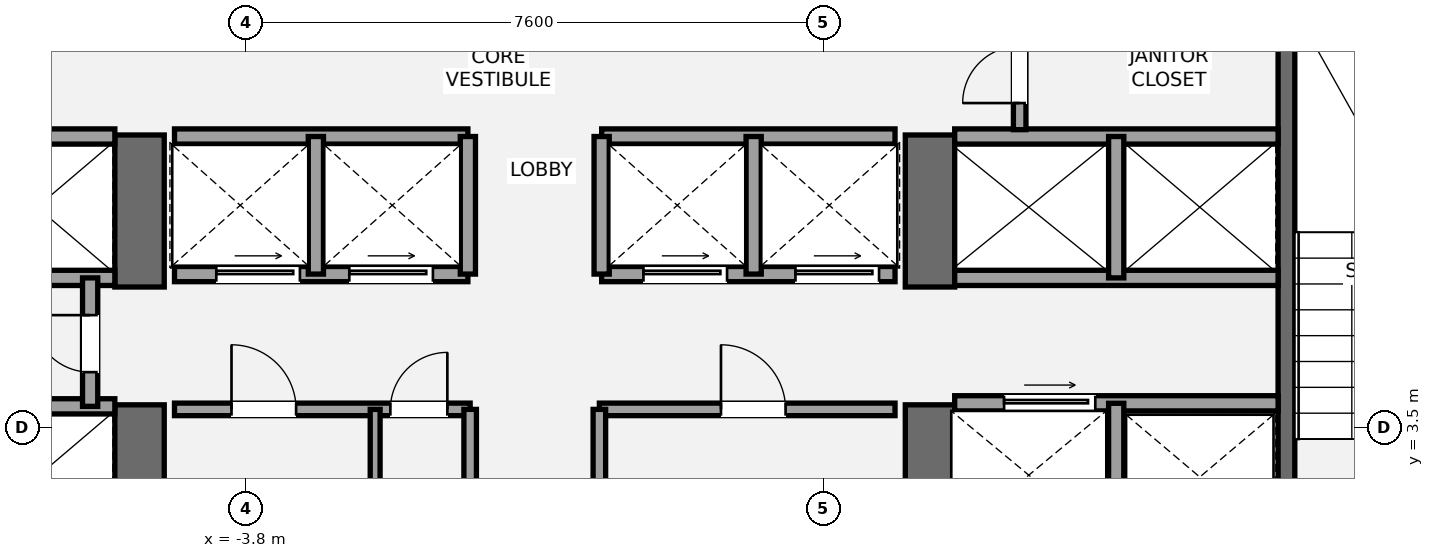
"""IFC4 building model, lengths in metres.
Left out: names, types, materials, properties, quantities, classifications, styles, units other than length and angle.
Written with IfcOpenShell. Run it as: python <this file> out.ifc"""

import sys

from ifc_helpers import new_model, si_unit, direction, frame, frame_2d, origin, place, context, subcontext, project, spatial, rectangle, extrude, element, fill, save


model = new_model("IFC4")
c1 = context("Model", 3, precision=1e-05, world=origin(), true_north=direction((0.0, 1.0)))
c2 = subcontext(c1, "Body", "Model", "MODEL_VIEW")
j1 = project(units=[si_unit("LENGTHUNIT", "METRE"), si_unit("PLANEANGLEUNIT", "RADIAN")], contexts=[c1])
p1 = place(None, origin())
s1 = spatial("IfcSite", under=j1, at=p1, CompositionType="ELEMENT")
p2 = place(p1, origin())
s2 = spatial("IfcBuilding", under=s1, at=p2, CompositionType="ELEMENT")
p3 = place(p2, frame((0.0, 0.0, 191.8)))
s3 = spatial("IfcBuildingStorey", under=s2, at=p3, CompositionType="ELEMENT", Elevation=191.8)
p4 = place(p3, frame((-5.2, 1.2, 0.0), z_axis=(0.0, 0.0, 1.0), x_axis=(0.0, 1.0, 0.0)))
e1 = element("IfcWall", 1, at=p4, inside=s3, PredefinedType="SHEAR", context=c2, shape_type="SweptSolid", body=[
    extrude(rectangle(XDim=2.6, YDim=0.65, at=frame_2d((1.3, 0.0))), origin(), (0.0, 0.0, 1.0), 3.2),
])
p5 = place(p3, frame((-5.2, 5.35, 0.0), z_axis=(0.0, 0.0, 1.0), x_axis=(0.0, 1.0, 0.0)))
e2 = element("IfcWall", 2, at=p5, inside=s3, PredefinedType="SHEAR", context=c2, shape_type="SweptSolid", body=[
    extrude(rectangle(XDim=2.0, YDim=0.65, at=frame_2d((1.0, 0.0))), origin(), (0.0, 0.0, 1.0), 3.2),
])
p6 = place(p3, frame((5.2, 1.2, 0.0), z_axis=(0.0, 0.0, 1.0), x_axis=(0.0, 1.0, 0.0)))
e3 = element("IfcWall", 3, at=p6, inside=s3, PredefinedType="SHEAR", context=c2, shape_type="SweptSolid", body=[
    extrude(rectangle(XDim=2.6, YDim=0.65, at=frame_2d((1.3, 0.0))), origin(), (0.0, 0.0, 1.0), 3.2),
])
p7 = place(p3, frame((5.2, 5.35, 0.0), z_axis=(0.0, 0.0, 1.0), x_axis=(0.0, 1.0, 0.0)))
e4 = element("IfcWall", 4, at=p7, inside=s3, PredefinedType="SHEAR", context=c2, shape_type="SweptSolid", body=[
    extrude(rectangle(XDim=2.0, YDim=0.65, at=frame_2d((1.0, 0.0))), origin(), (0.0, 0.0, 1.0), 3.2),
])
p8 = place(p3, frame((9.89, 1.85, 0.0), z_axis=(0.0, 0.0, 1.0), x_axis=(0.0, 1.0, 0.0)))
e5 = element("IfcWall", 5, at=p8, inside=s3, PredefinedType="SHEAR", context=c2, shape_type="SweptSolid", body=[
    extrude(rectangle(XDim=7.15, YDim=0.22, at=frame_2d((3.575, 0.0))), origin(), (0.0, 0.0, 1.0), 3.2),
])
for number, where, z_axis, x_axis in (
    (6, (-9.78, 3.78, 0.0), (0.0, 0.0, 1.0), (1.0, 0.0, 0.0)),
    (7, (-9.78, 5.47, 0.0), (0.0, 0.0, 1.0), (1.0, 0.0, 0.0)),
    (8, (-9.78, 7.33, 0.0), (0.0, 0.0, 1.0), (1.0, 0.0, 0.0)),
):
    element("IfcWall", number, at=place(p3, frame(where, z_axis=z_axis, x_axis=x_axis)), inside=s3, PredefinedType="SOLIDWALL", context=c2, shape_type="SweptSolid", body=[
        extrude(rectangle(XDim=4.255, YDim=0.2, at=frame_2d((2.127, 0.0))), origin(), (0.0, 0.0, 1.0), 3.02),
    ])
p9 = place(p3, frame((-5.85, 3.78, 0.0), z_axis=(0.0, 0.0, 1.0), x_axis=(0.0, 1.0, 0.0)))
e9 = element("IfcWall", 9, at=p9, inside=s3, PredefinedType="SOLIDWALL", context=c2, shape_type="SweptSolid", body=[
    extrude(rectangle(XDim=1.69, YDim=0.2, at=frame_2d((0.845, 0.0))), origin(), (0.0, 0.0, 1.0), 3.02),
])
p10 = place(p9, frame((0.45, 0.0, 0.0)))
e10 = element("IfcOpeningElement", 10, at=p10, cuts=e9, PredefinedType="OPENING", context=c2, shape_type="SweptSolid", body=[
    extrude(rectangle(XDim=0.75, YDim=2.1, at=frame_2d((0.375, 1.05))), frame((0.0, 0.11, 0.0), z_axis=(0.0, -1.0, 0.0), x_axis=(1.0, 0.0, 0.0)), (0.0, 0.0, 1.0), 0.22),
])
p11 = place(p3, frame((5.525, 3.82, 0.0), z_axis=(0.0, 0.0, 1.0), x_axis=(1.0, 0.0, 0.0)))
e11 = element("IfcWall", 11, at=p11, inside=s3, PredefinedType="SOLIDWALL", context=c2, shape_type="SweptSolid", body=[
    extrude(rectangle(XDim=4.255, YDim=0.2, at=frame_2d((2.127, 0.0))), origin(), (0.0, 0.0, 1.0), 3.02),
])
p12 = place(p11, frame((0.65, 0.0, 0.0)))
e12 = element("IfcOpeningElement", 12, at=p12, cuts=e11, PredefinedType="OPENING", context=c2, shape_type="SweptSolid", body=[
    extrude(rectangle(XDim=1.2, YDim=2.2, at=frame_2d((0.6, 1.1))), frame((0.0, 0.11, 0.0), z_axis=(0.0, -1.0, 0.0), x_axis=(1.0, 0.0, 0.0)), (0.0, 0.0, 1.0), 0.22),
])
p13 = place(p3, frame((7.65, 1.85, 0.0), z_axis=(0.0, 0.0, 1.0), x_axis=(0.0, 1.0, 0.0)))
e13 = element("IfcWall", 13, at=p13, inside=s3, PredefinedType="SOLIDWALL", context=c2, shape_type="SweptSolid", body=[
    extrude(rectangle(XDim=1.97, YDim=0.2, at=frame_2d((0.985, 0.0))), origin(), (0.0, 0.0, 1.0), 3.02),
])
for number, where, z_axis, x_axis in (
    (14, (5.525, 5.47, 0.0), (0.0, 0.0, 1.0), (1.0, 0.0, 0.0)),
    (15, (5.525, 7.33, 0.0), (0.0, 0.0, 1.0), (1.0, 0.0, 0.0)),
):
    element("IfcWall", number, at=place(p3, frame(where, z_axis=z_axis, x_axis=x_axis)), inside=s3, PredefinedType="SOLIDWALL", context=c2, shape_type="SweptSolid", body=[
        extrude(rectangle(XDim=4.255, YDim=0.2, at=frame_2d((2.127, 0.0))), origin(), (0.0, 0.0, 1.0), 3.02),
    ])
p14 = place(p3, frame((7.65, 5.47, 0.0), z_axis=(0.0, 0.0, 1.0), x_axis=(0.0, 1.0, 0.0)))
e16 = element("IfcWall", 16, at=p14, inside=s3, PredefinedType="SOLIDWALL", context=c2, shape_type="SweptSolid", body=[
    extrude(rectangle(XDim=1.86, YDim=0.2, at=frame_2d((0.93, 0.0))), origin(), (0.0, 0.0, 1.0), 3.02),
])
p15 = place(p3, frame((-4.74, 3.74, 0.0), z_axis=(0.0, 0.0, 1.0), x_axis=(1.0, 0.0, 0.0)))
e17 = element("IfcWall", 17, at=p15, inside=s3, PredefinedType="PARTITIONING", context=c2, shape_type="SweptSolid", body=[
    extrude(rectangle(XDim=3.89, YDim=0.165, at=frame_2d((1.945, 0.0))), origin(), (0.0, 0.0, 1.0), 3.02),
])
p16 = place(p15, frame((0.75, 0.0, 0.0)))
e18 = element("IfcOpeningElement", 18, at=p16, cuts=e17, PredefinedType="OPENING", context=c2, shape_type="SweptSolid", body=[
    extrude(rectangle(XDim=0.85, YDim=2.1, at=frame_2d((0.425, 1.05))), frame((0.0, 0.093, 0.0), z_axis=(0.0, -1.0, 0.0), x_axis=(1.0, 0.0, 0.0)), (0.0, 0.0, 1.0), 0.185),
])
p17 = place(p15, frame((2.84, 0.0, 0.0)))
e19 = element("IfcOpeningElement", 19, at=p17, cuts=e17, PredefinedType="OPENING", context=c2, shape_type="SweptSolid", body=[
    extrude(rectangle(XDim=0.75, YDim=2.1, at=frame_2d((0.375, 1.05))), frame((0.0, 0.093, 0.0), z_axis=(0.0, -1.0, 0.0), x_axis=(1.0, 0.0, 0.0)), (0.0, 0.0, 1.0), 0.185),
])
p18 = place(p3, frame((-0.85, 1.92, 0.0), z_axis=(0.0, 0.0, 1.0), x_axis=(0.0, 1.0, 0.0)))
e20 = element("IfcWall", 20, at=p18, inside=s3, PredefinedType="PARTITIONING", context=c2, shape_type="SweptSolid", body=[
    extrude(rectangle(XDim=1.82, YDim=0.165, at=frame_2d((0.91, 0.0))), origin(), (0.0, 0.0, 1.0), 3.02),
])
p19 = place(p3, frame((0.85, 3.74, 0.0), z_axis=(0.0, 0.0, 1.0), x_axis=(1.0, 0.0, 0.0)))
e21 = element("IfcWall", 21, at=p19, inside=s3, PredefinedType="PARTITIONING", context=c2, shape_type="SweptSolid", body=[
    extrude(rectangle(XDim=3.89, YDim=0.165, at=frame_2d((1.945, 0.0))), origin(), (0.0, 0.0, 1.0), 3.02),
])
p20 = place(p19, frame((1.6, 0.0, 0.0)))
e22 = element("IfcOpeningElement", 22, at=p20, cuts=e21, PredefinedType="OPENING", context=c2, shape_type="SweptSolid", body=[
    extrude(rectangle(XDim=0.85, YDim=2.1, at=frame_2d((0.425, 1.05))), frame((0.0, 0.093, 0.0), z_axis=(0.0, -1.0, 0.0), x_axis=(1.0, 0.0, 0.0)), (0.0, 0.0, 1.0), 0.185),
])
p21 = place(p3, frame((0.85, 1.92, 0.0), z_axis=(0.0, 0.0, 1.0), x_axis=(0.0, 1.0, 0.0)))
e23 = element("IfcWall", 23, at=p21, inside=s3, PredefinedType="PARTITIONING", context=c2, shape_type="SweptSolid", body=[
    extrude(rectangle(XDim=1.82, YDim=0.165, at=frame_2d((0.91, 0.0))), origin(), (0.0, 0.0, 1.0), 3.02),
])
p22 = place(p3, frame((-2.1, 1.92, 0.0), z_axis=(0.0, 0.0, 1.0), x_axis=(0.0, 1.0, 0.0)))
e24 = element("IfcWall", 24, at=p22, inside=s3, PredefinedType="PARTITIONING", context=c2, shape_type="SweptSolid", body=[
    extrude(rectangle(XDim=1.82, YDim=0.13, at=frame_2d((0.91, 0.0))), origin(), (0.0, 0.0, 1.0), 3.02),
])
p23 = place(p3, frame((-4.74, 5.52, 0.0), z_axis=(0.0, 0.0, 1.0), x_axis=(1.0, 0.0, 0.0)))
e25 = element("IfcWall", 25, at=p23, inside=s3, PredefinedType="SOLIDWALL", context=c2, shape_type="SweptSolid", body=[
    extrude(rectangle(XDim=3.86, YDim=0.2, at=frame_2d((1.93, 0.0))), origin(), (0.0, 0.0, 1.0), 3.02),
])
p24 = place(p23, frame((0.55, 0.0, 0.0)))
e26 = element("IfcOpeningElement", 26, at=p24, cuts=e25, PredefinedType="OPENING", context=c2, shape_type="SweptSolid", body=[
    extrude(rectangle(XDim=1.1, YDim=2.2, at=frame_2d((0.55, 1.1))), frame((0.0, 0.11, 0.0), z_axis=(0.0, -1.0, 0.0), x_axis=(1.0, 0.0, 0.0)), (0.0, 0.0, 1.0), 0.22),
])
p25 = place(p23, frame((2.3, 0.0, 0.0)))
e27 = element("IfcOpeningElement", 27, at=p25, cuts=e25, PredefinedType="OPENING", context=c2, shape_type="SweptSolid", body=[
    extrude(rectangle(XDim=1.1, YDim=2.2, at=frame_2d((0.55, 1.1))), frame((0.0, 0.11, 0.0), z_axis=(0.0, -1.0, 0.0), x_axis=(1.0, 0.0, 0.0)), (0.0, 0.0, 1.0), 0.22),
])
p26 = place(p3, frame((0.88, 5.52, 0.0), z_axis=(0.0, 0.0, 1.0), x_axis=(1.0, 0.0, 0.0)))
e28 = element("IfcWall", 28, at=p26, inside=s3, PredefinedType="SOLIDWALL", context=c2, shape_type="SweptSolid", body=[
    extrude(rectangle(XDim=3.86, YDim=0.2, at=frame_2d((1.93, 0.0))), origin(), (0.0, 0.0, 1.0), 3.02),
])
p27 = place(p26, frame((0.55, 0.0, 0.0)))
e29 = element("IfcOpeningElement", 29, at=p27, cuts=e28, PredefinedType="OPENING", context=c2, shape_type="SweptSolid", body=[
    extrude(rectangle(XDim=1.1, YDim=2.2, at=frame_2d((0.55, 1.1))), frame((0.0, 0.11, 0.0), z_axis=(0.0, -1.0, 0.0), x_axis=(1.0, 0.0, 0.0)), (0.0, 0.0, 1.0), 0.22),
])
p28 = place(p26, frame((2.55, 0.0, 0.0)))
e30 = element("IfcOpeningElement", 30, at=p28, cuts=e28, PredefinedType="OPENING", context=c2, shape_type="SweptSolid", body=[
    extrude(rectangle(XDim=1.1, YDim=2.2, at=frame_2d((0.55, 1.1))), frame((0.0, 0.11, 0.0), z_axis=(0.0, -1.0, 0.0), x_axis=(1.0, 0.0, 0.0)), (0.0, 0.0, 1.0), 0.22),
])
for number, where, z_axis, x_axis in (
    (31, (-4.74, 7.33, 0.0), (0.0, 0.0, 1.0), (1.0, 0.0, 0.0)),
    (32, (0.88, 7.33, 0.0), (0.0, 0.0, 1.0), (1.0, 0.0, 0.0)),
):
    element("IfcWall", number, at=place(p3, frame(where, z_axis=z_axis, x_axis=x_axis)), inside=s3, PredefinedType="SOLIDWALL", context=c2, shape_type="SweptSolid", body=[
        extrude(rectangle(XDim=3.86, YDim=0.2, at=frame_2d((1.93, 0.0))), origin(), (0.0, 0.0, 1.0), 3.02),
    ])
for number, where, z_axis, x_axis in (
    (33, (-2.88, 5.52, 0.0), (0.0, 0.0, 1.0), (0.0, 1.0, 0.0)),
    (34, (2.88, 5.52, 0.0), (0.0, 0.0, 1.0), (0.0, 1.0, 0.0)),
    (35, (-0.88, 5.52, 0.0), (0.0, 0.0, 1.0), (0.0, 1.0, 0.0)),
    (36, (0.88, 5.52, 0.0), (0.0, 0.0, 1.0), (0.0, 1.0, 0.0)),
):
    element("IfcWall", number, at=place(p3, frame(where, z_axis=z_axis, x_axis=x_axis)), inside=s3, PredefinedType="SOLIDWALL", context=c2, shape_type="SweptSolid", body=[
        extrude(rectangle(XDim=1.81, YDim=0.2, at=frame_2d((0.905, 0.0))), origin(), (0.0, 0.0, 1.0), 3.02),
    ])
p29 = place(p3, frame((6.38, 7.42, 0.0), z_axis=(0.0, 0.0, 1.0), x_axis=(0.0, 1.0, 0.0)))
e37 = element("IfcWall", 37, at=p29, inside=s3, PredefinedType="PARTITIONING", context=c2, shape_type="SweptSolid", body=[
    extrude(rectangle(XDim=1.58, YDim=0.165, at=frame_2d((0.79, 0.0))), origin(), (0.0, 0.0, 1.0), 3.02),
])
p30 = place(p29, frame((0.35, 0.0, 0.0)))
e38 = element("IfcOpeningElement", 38, at=p30, cuts=e37, PredefinedType="OPENING", context=c2, shape_type="SweptSolid", body=[
    extrude(rectangle(XDim=0.75, YDim=2.1, at=frame_2d((0.375, 1.05))), frame((0.0, 0.093, 0.0), z_axis=(0.0, -1.0, 0.0), x_axis=(1.0, 0.0, 0.0)), (0.0, 0.0, 1.0), 0.185),
])
p31 = place(p10, origin())
e39 = element("IfcDoor", 39, at=p31, inside=s3, OperationType="SINGLE_SWING_RIGHT", PredefinedType="DOOR", context=c2, shape_type="SweptSolid", body=[
    extrude(rectangle(XDim=0.75, YDim=2.1, at=frame_2d((0.375, 1.05))), frame((0.0, 0.025, 0.0), z_axis=(0.0, -1.0, 0.0), x_axis=(1.0, 0.0, 0.0)), (0.0, 0.0, 1.0), 0.05),
])
fill(e10, e39)
p32 = place(p12, origin())
e40 = element("IfcDoor", 40, at=p32, inside=s3, OperationType="SLIDING_TO_RIGHT", PredefinedType="DOOR", context=c2, shape_type="SweptSolid", body=[
    extrude(rectangle(XDim=1.2, YDim=2.2, at=frame_2d((0.6, 1.1))), frame((0.0, 0.025, 0.0), z_axis=(0.0, -1.0, 0.0), x_axis=(1.0, 0.0, 0.0)), (0.0, 0.0, 1.0), 0.05),
])
fill(e12, e40)
p33 = place(p16, origin())
e41 = element("IfcDoor", 41, at=p33, inside=s3, OperationType="SINGLE_SWING_LEFT", PredefinedType="DOOR", context=c2, shape_type="SweptSolid", body=[
    extrude(rectangle(XDim=0.85, YDim=2.1, at=frame_2d((0.425, 1.05))), frame((0.0, 0.025, 0.0), z_axis=(0.0, -1.0, 0.0), x_axis=(1.0, 0.0, 0.0)), (0.0, 0.0, 1.0), 0.05),
])
fill(e18, e41)
p34 = place(p17, origin())
e42 = element("IfcDoor", 42, at=p34, inside=s3, OperationType="SINGLE_SWING_RIGHT", PredefinedType="DOOR", context=c2, shape_type="SweptSolid", body=[
    extrude(rectangle(XDim=0.75, YDim=2.1, at=frame_2d((0.375, 1.05))), frame((0.0, 0.025, 0.0), z_axis=(0.0, -1.0, 0.0), x_axis=(1.0, 0.0, 0.0)), (0.0, 0.0, 1.0), 0.05),
])
fill(e19, e42)
p35 = place(p20, origin())
e43 = element("IfcDoor", 43, at=p35, inside=s3, OperationType="SINGLE_SWING_LEFT", PredefinedType="DOOR", context=c2, shape_type="SweptSolid", body=[
    extrude(rectangle(XDim=0.85, YDim=2.1, at=frame_2d((0.425, 1.05))), frame((0.0, 0.025, 0.0), z_axis=(0.0, -1.0, 0.0), x_axis=(1.0, 0.0, 0.0)), (0.0, 0.0, 1.0), 0.05),
])
fill(e22, e43)
p36 = place(p24, origin())
e44 = element("IfcDoor", 44, at=p36, inside=s3, OperationType="SLIDING_TO_LEFT", PredefinedType="DOOR", context=c2, shape_type="SweptSolid", body=[
    extrude(rectangle(XDim=1.1, YDim=2.2, at=frame_2d((0.55, 1.1))), frame((0.0, 0.025, 0.0), z_axis=(0.0, -1.0, 0.0), x_axis=(1.0, 0.0, 0.0)), (0.0, 0.0, 1.0), 0.05),
])
fill(e26, e44)
p37 = place(p25, origin())
e45 = element("IfcDoor", 45, at=p37, inside=s3, OperationType="SLIDING_TO_LEFT", PredefinedType="DOOR", context=c2, shape_type="SweptSolid", body=[
    extrude(rectangle(XDim=1.1, YDim=2.2, at=frame_2d((0.55, 1.1))), frame((0.0, 0.025, 0.0), z_axis=(0.0, -1.0, 0.0), x_axis=(1.0, 0.0, 0.0)), (0.0, 0.0, 1.0), 0.05),
])
fill(e27, e45)
p38 = place(p27, origin())
e46 = element("IfcDoor", 46, at=p38, inside=s3, OperationType="SLIDING_TO_LEFT", PredefinedType="DOOR", context=c2, shape_type="SweptSolid", body=[
    extrude(rectangle(XDim=1.1, YDim=2.2, at=frame_2d((0.55, 1.1))), frame((0.0, 0.025, 0.0), z_axis=(0.0, -1.0, 0.0), x_axis=(1.0, 0.0, 0.0)), (0.0, 0.0, 1.0), 0.05),
])
fill(e29, e46)
p39 = place(p28, origin())
e47 = element("IfcDoor", 47, at=p39, inside=s3, OperationType="SLIDING_TO_LEFT", PredefinedType="DOOR", context=c2, shape_type="SweptSolid", body=[
    extrude(rectangle(XDim=1.1, YDim=2.2, at=frame_2d((0.55, 1.1))), frame((0.0, 0.025, 0.0), z_axis=(0.0, -1.0, 0.0), x_axis=(1.0, 0.0, 0.0)), (0.0, 0.0, 1.0), 0.05),
])
fill(e30, e47)
p40 = place(p30, origin())
e48 = element("IfcDoor", 48, at=p40, inside=s3, OperationType="SINGLE_SWING_LEFT", PredefinedType="DOOR", context=c2, shape_type="SweptSolid", body=[
    extrude(rectangle(XDim=0.75, YDim=2.1, at=frame_2d((0.375, 1.05))), frame((0.0, 0.025, 0.0), z_axis=(0.0, -1.0, 0.0), x_axis=(1.0, 0.0, 0.0)), (0.0, 0.0, 1.0), 0.05),
])
fill(e38, e48)
save(model, sys.argv[1])
